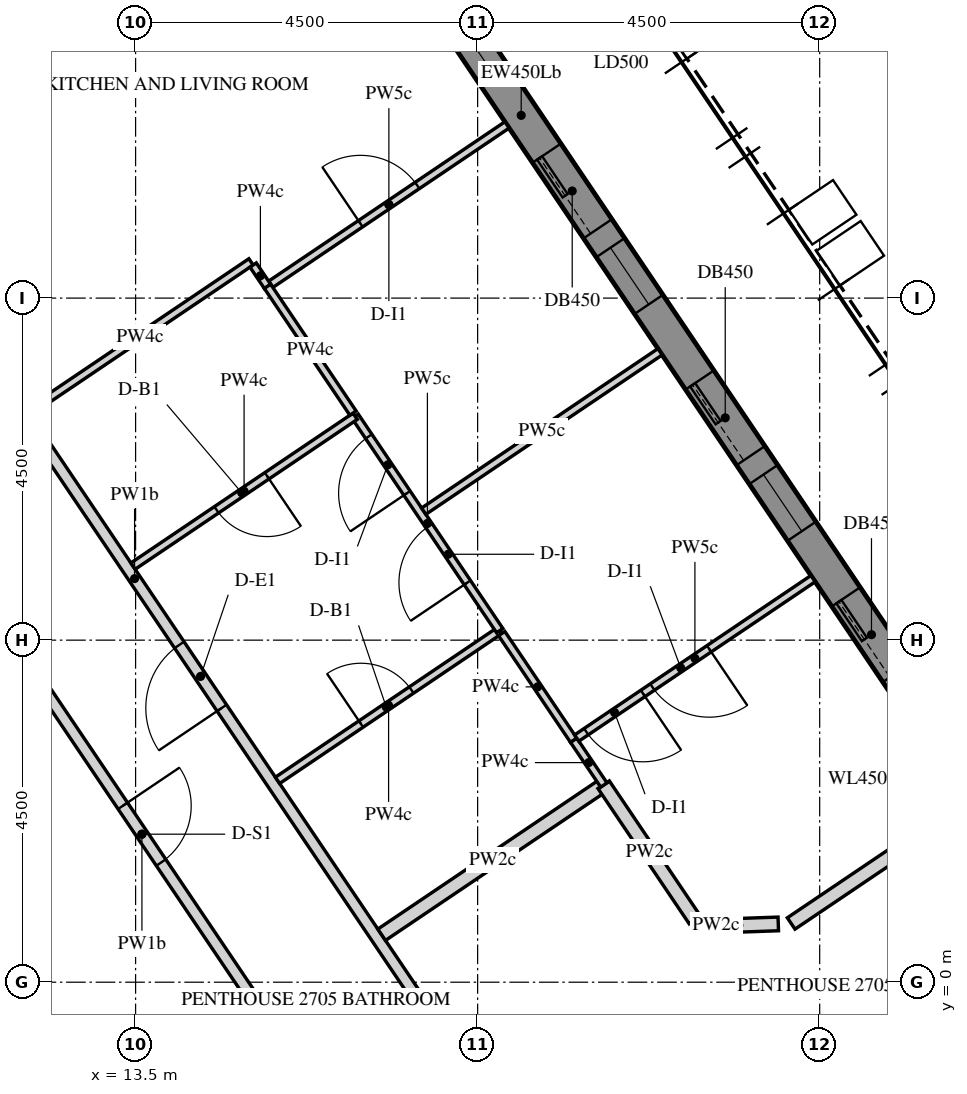
"""IFC4 building model, lengths in metres.
Left out: names, types, materials, properties, quantities, classifications, styles, units other than length and angle.
Written with IfcOpenShell. Run it as: python <this file> out.ifc"""

import sys

from ifc_helpers import new_model, si_unit, direction, frame, frame_2d, origin, place, context, subcontext, project, spatial, polyline, rectangle, outline, extrude, element, fill, save


model = new_model("IFC4")
c1 = context("Model", 3, precision=1e-05, world=origin(), true_north=direction((0.0, 1.0)))
c2 = subcontext(c1, "Body", "Model", "MODEL_VIEW")
j1 = project(units=[si_unit("LENGTHUNIT", "METRE"), si_unit("PLANEANGLEUNIT", "RADIAN")], contexts=[c1])
p1 = place(None, origin())
s1 = spatial("IfcSite", under=j1, at=p1, CompositionType="ELEMENT")
p2 = place(p1, origin())
s2 = spatial("IfcBuilding", under=s1, at=p2, CompositionType="ELEMENT")
p3 = place(p2, frame((0.0, 0.0, 349.5)))
s3 = spatial("IfcBuildingStorey", under=s2, at=p3, CompositionType="ELEMENT", Elevation=349.5)
p4 = place(p3, frame((24.37, 2.811, 0.0), z_axis=(0.0, 0.0, 1.0), x_axis=(-0.559187034749, 0.829041531027, 0.0)))
e1 = element("IfcWall", 1, at=p4, inside=s3, PredefinedType="SOLIDWALL", context=c2, shape_type="SweptSolid", body=[
    extrude(outline(polyline([(0.225, -0.225), (20.506, -0.225), (20.957, 0.225), (-0.225, 0.225), (0.225, -0.225)])), origin(), (0.0, 0.0, 1.0), 3.75),
])
p5 = place(p4, frame((0.325, 0.0, 0.9)))
e2 = element("IfcOpeningElement", 2, at=p5, cuts=e1, PredefinedType="OPENING", context=c2, shape_type="SweptSolid", body=[
    extrude(rectangle(XDim=0.9, YDim=1.5, at=frame_2d((0.45, 0.75))), frame((0.0, 0.235, 0.0), z_axis=(0.0, -1.0, 0.0), x_axis=(1.0, 0.0, 0.0)), (0.0, 0.0, 1.0), 0.47),
])
p6 = place(p4, frame((1.525, 0.0, 0.0)))
e3 = element("IfcOpeningElement", 3, at=p6, cuts=e1, PredefinedType="OPENING", context=c2, shape_type="SweptSolid", body=[
    extrude(rectangle(XDim=1.2, YDim=2.4, at=frame_2d((0.6, 1.2))), frame((0.0, 0.235, 0.0), z_axis=(0.0, -1.0, 0.0), x_axis=(1.0, 0.0, 0.0)), (0.0, 0.0, 1.0), 0.47),
])
p7 = place(p4, frame((3.766, 0.0, 0.9)))
e4 = element("IfcOpeningElement", 4, at=p7, cuts=e1, PredefinedType="OPENING", context=c2, shape_type="SweptSolid", body=[
    extrude(rectangle(XDim=0.9, YDim=1.5, at=frame_2d((0.45, 0.75))), frame((0.0, 0.235, 0.0), z_axis=(0.0, -1.0, 0.0), x_axis=(1.0, 0.0, 0.0)), (0.0, 0.0, 1.0), 0.47),
])
p8 = place(p4, frame((4.966, 0.0, 0.0)))
e5 = element("IfcOpeningElement", 5, at=p8, cuts=e1, PredefinedType="OPENING", context=c2, shape_type="SweptSolid", body=[
    extrude(rectangle(XDim=1.2, YDim=2.4, at=frame_2d((0.6, 1.2))), frame((0.0, 0.235, 0.0), z_axis=(0.0, -1.0, 0.0), x_axis=(1.0, 0.0, 0.0)), (0.0, 0.0, 1.0), 0.47),
])
p9 = place(p4, frame((7.366, 0.0, 0.9)))
e6 = element("IfcOpeningElement", 6, at=p9, cuts=e1, PredefinedType="OPENING", context=c2, shape_type="SweptSolid", body=[
    extrude(rectangle(XDim=0.9, YDim=1.5, at=frame_2d((0.45, 0.75))), frame((0.0, 0.235, 0.0), z_axis=(0.0, -1.0, 0.0), x_axis=(1.0, 0.0, 0.0)), (0.0, 0.0, 1.0), 0.47),
])
p10 = place(p4, frame((8.566, 0.0, 0.0)))
e7 = element("IfcOpeningElement", 7, at=p10, cuts=e1, PredefinedType="OPENING", context=c2, shape_type="SweptSolid", body=[
    extrude(rectangle(XDim=1.2, YDim=2.4, at=frame_2d((0.6, 1.2))), frame((0.0, 0.235, 0.0), z_axis=(0.0, -1.0, 0.0), x_axis=(1.0, 0.0, 0.0)), (0.0, 0.0, 1.0), 0.47),
])
p11 = place(p4, frame((10.966, 0.0, 0.9)))
e8 = element("IfcOpeningElement", 8, at=p11, cuts=e1, PredefinedType="OPENING", context=c2, shape_type="SweptSolid", body=[
    extrude(rectangle(XDim=0.9, YDim=1.5, at=frame_2d((0.45, 0.75))), frame((0.0, 0.235, 0.0), z_axis=(0.0, -1.0, 0.0), x_axis=(1.0, 0.0, 0.0)), (0.0, 0.0, 1.0), 0.47),
])
p12 = place(p4, frame((12.166, 0.0, 0.0)))
e9 = element("IfcOpeningElement", 9, at=p12, cuts=e1, PredefinedType="OPENING", context=c2, shape_type="SweptSolid", body=[
    extrude(rectangle(XDim=1.2, YDim=2.4, at=frame_2d((0.6, 1.2))), frame((0.0, 0.235, 0.0), z_axis=(0.0, -1.0, 0.0), x_axis=(1.0, 0.0, 0.0)), (0.0, 0.0, 1.0), 0.47),
])
p13 = place(p4, frame((14.566, 0.0, 0.9)))
e10 = element("IfcOpeningElement", 10, at=p13, cuts=e1, PredefinedType="OPENING", context=c2, shape_type="SweptSolid", body=[
    extrude(rectangle(XDim=0.9, YDim=1.5, at=frame_2d((0.45, 0.75))), frame((0.0, 0.235, 0.0), z_axis=(0.0, -1.0, 0.0), x_axis=(1.0, 0.0, 0.0)), (0.0, 0.0, 1.0), 0.47),
])
p14 = place(p4, frame((15.766, 0.0, 0.0)))
e11 = element("IfcOpeningElement", 11, at=p14, cuts=e1, PredefinedType="OPENING", context=c2, shape_type="SweptSolid", body=[
    extrude(rectangle(XDim=1.2, YDim=2.4, at=frame_2d((0.6, 1.2))), frame((0.0, 0.235, 0.0), z_axis=(0.0, -1.0, 0.0), x_axis=(1.0, 0.0, 0.0)), (0.0, 0.0, 1.0), 0.47),
])
p15 = place(p4, frame((18.007, 0.0, 0.9)))
e12 = element("IfcOpeningElement", 12, at=p15, cuts=e1, PredefinedType="OPENING", context=c2, shape_type="SweptSolid", body=[
    extrude(rectangle(XDim=0.9, YDim=1.5, at=frame_2d((0.45, 0.75))), frame((0.0, 0.235, 0.0), z_axis=(0.0, -1.0, 0.0), x_axis=(1.0, 0.0, 0.0)), (0.0, 0.0, 1.0), 0.47),
])
p16 = place(p4, frame((19.207, 0.0, 0.0)))
e13 = element("IfcOpeningElement", 13, at=p16, cuts=e1, PredefinedType="OPENING", context=c2, shape_type="SweptSolid", body=[
    extrude(rectangle(XDim=1.2, YDim=2.4, at=frame_2d((0.6, 1.2))), frame((0.0, 0.235, 0.0), z_axis=(0.0, -1.0, 0.0), x_axis=(1.0, 0.0, 0.0)), (0.0, 0.0, 1.0), 0.47),
])
p17 = place(p3, frame((5.773, 10.0, 0.0), z_axis=(0.0, 0.0, 1.0), x_axis=(0.500007911273, 0.866020836161, 0.0)))
e14 = element("IfcWall", 14, at=p17, inside=s3, PredefinedType="SHEAR", context=c2, shape_type="SweptSolid", body=[
    extrude(rectangle(XDim=14.51, YDim=0.35, at=frame_2d((7.255, 0.0))), origin(), (0.0, 0.0, 1.0), 3.75),
])
p18 = place(p17, frame((6.355, 0.0, 0.0)))
e15 = element("IfcOpeningElement", 15, at=p18, cuts=e14, PredefinedType="OPENING", context=c2, shape_type="SweptSolid", body=[
    extrude(rectangle(XDim=1.8, YDim=2.4, at=frame_2d((0.9, 1.2))), frame((0.0, 0.185, 0.0), z_axis=(0.0, -1.0, 0.0), x_axis=(1.0, 0.0, 0.0)), (0.0, 0.0, 1.0), 0.37),
])
p19 = place(p3, frame((17.873, -1.193, 0.0), z_axis=(0.0, 0.0, 1.0), x_axis=(-0.559195650252, 0.829035719821, 0.0)))
e16 = element("IfcWall", 16, at=p19, inside=s3, PredefinedType="PARTITIONING", context=c2, shape_type="SweptSolid", body=[
    extrude(rectangle(XDim=15.688, YDim=0.15, at=frame_2d((7.844, 0.0))), origin(), (0.0, 0.0, 1.0), 2.82),
])
p20 = place(p19, frame((5.792, 0.0, 0.0)))
e17 = element("IfcOpeningElement", 17, at=p20, cuts=e16, PredefinedType="OPENING", context=c2, shape_type="SweptSolid", body=[
    extrude(rectangle(XDim=1.0, YDim=2.1, at=frame_2d((0.5, 1.05))), frame((0.0, 0.085, 0.0), z_axis=(0.0, -1.0, 0.0), x_axis=(1.0, 0.0, 0.0)), (0.0, 0.0, 1.0), 0.17),
])
p21 = place(p3, frame((11.368, 5.231, 0.0), z_axis=(0.0, 0.0, 1.0), x_axis=(0.55919388604, -0.829036909803, 0.0)))
e18 = element("IfcWall", 18, at=p21, inside=s3, PredefinedType="PARTITIONING", context=c2, shape_type="SweptSolid", body=[
    extrude(rectangle(XDim=7.922, YDim=0.15, at=frame_2d((3.961, 0.0))), origin(), (0.0, 0.0, 1.0), 2.82),
])
p22 = place(p21, frame((3.511, 0.0, 0.0)))
e19 = element("IfcOpeningElement", 19, at=p22, cuts=e18, PredefinedType="OPENING", context=c2, shape_type="SweptSolid", body=[
    extrude(rectangle(XDim=0.9, YDim=2.1, at=frame_2d((0.45, 1.05))), frame((0.0, 0.085, 0.0), z_axis=(0.0, -1.0, 0.0), x_axis=(1.0, 0.0, 0.0)), (0.0, 0.0, 1.0), 0.17),
])
p23 = place(p3, frame((19.66, 2.595, 0.0), z_axis=(0.0, 0.0, 1.0), x_axis=(-0.829033300448, -0.559199237078, 0.0)))
e20 = element("IfcWall", 20, at=p23, inside=s3, PredefinedType="PARTITIONING", context=c2, shape_type="SweptSolid", body=[
    extrude(rectangle(XDim=3.525, YDim=0.18, at=frame_2d((1.763, 0.0))), origin(), (0.0, 0.0, 1.0), 2.82),
])
p24 = place(p3, frame((26.084, 3.443, 0.0), z_axis=(0.0, 0.0, 1.0), x_axis=(-0.829033545972, -0.559198873079, 0.0)))
e21 = element("IfcWall", 21, at=p24, inside=s3, PredefinedType="PARTITIONING", context=c2, shape_type="SweptSolid", body=[
    extrude(rectangle(XDim=4.775, YDim=0.18, at=frame_2d((2.388, 0.0))), origin(), (0.0, 0.0, 1.0), 2.82),
])
p25 = place(p3, frame((21.955, 0.767, 0.0), z_axis=(0.0, 0.0, 1.0), x_axis=(-0.999394211814, -0.034802433729, 0.0)))
e22 = element("IfcWall", 22, at=p25, inside=s3, PredefinedType="PARTITIONING", context=c2, shape_type="SweptSolid", body=[
    extrude(rectangle(XDim=1.038, YDim=0.18, at=frame_2d((0.519, 0.0))), origin(), (0.0, 0.0, 1.0), 2.82),
])
p26 = place(p3, frame((20.858, 0.818, 0.0), z_axis=(0.0, 0.0, 1.0), x_axis=(-0.55920528272, 0.829029222512, 0.0)))
e23 = element("IfcWall", 23, at=p26, inside=s3, PredefinedType="PARTITIONING", context=c2, shape_type="SweptSolid", body=[
    extrude(rectangle(XDim=2.147, YDim=0.18, at=frame_2d((1.074, 0.0))), origin(), (0.0, 0.0, 1.0), 2.82),
])
p27 = place(p3, frame((15.278, 9.181, 0.0), z_axis=(0.0, 0.0, 1.0), x_axis=(0.829043350963, 0.559184336534, 0.0)))
e24 = element("IfcWall", 24, at=p27, inside=s3, PredefinedType="PARTITIONING", context=c2, shape_type="SweptSolid", body=[
    extrude(rectangle(XDim=3.75, YDim=0.1, at=frame_2d((1.875, 0.0))), origin(), (0.0, 0.0, 1.0), 2.82),
])
p28 = place(p27, frame((1.425, 0.0, 0.0)))
e25 = element("IfcOpeningElement", 25, at=p28, cuts=e24, PredefinedType="OPENING", context=c2, shape_type="SweptSolid", body=[
    extrude(rectangle(XDim=0.9, YDim=2.1, at=frame_2d((0.45, 1.05))), frame((0.0, 0.06, 0.0), z_axis=(0.0, -1.0, 0.0), x_axis=(1.0, 0.0, 0.0)), (0.0, 0.0, 1.0), 0.12),
])
p29 = place(p3, frame((12.096, 7.505, 0.0), z_axis=(0.0, 0.0, 1.0), x_axis=(0.829065408555, 0.559151632687, 0.0)))
e26 = element("IfcWall", 26, at=p29, inside=s3, PredefinedType="PARTITIONING", context=c2, shape_type="SweptSolid", body=[
    extrude(rectangle(XDim=3.525, YDim=0.1, at=frame_2d((1.762, 0.0))), origin(), (0.0, 0.0, 1.0), 2.82),
])
p30 = place(p3, frame((15.046, 9.435, 0.0), z_axis=(0.0, 0.0, 1.0), x_axis=(0.559141668278, -0.829072128826, 0.0)))
e27 = element("IfcWall", 27, at=p30, inside=s3, PredefinedType="PARTITIONING", context=c2, shape_type="SweptSolid", body=[
    extrude(rectangle(XDim=0.342, YDim=0.1, at=frame_2d((0.171, 0.0))), origin(), (0.0, 0.0, 1.0), 2.82),
])
p31 = place(p3, frame((15.367, 2.655, 0.0), z_axis=(0.0, 0.0, 1.0), x_axis=(0.829033300448, 0.559199237078, 0.0)))
e28 = element("IfcWall", 28, at=p31, inside=s3, PredefinedType="PARTITIONING", context=c2, shape_type="SweptSolid", body=[
    extrude(rectangle(XDim=3.525, YDim=0.1, at=frame_2d((1.763, 0.0))), origin(), (0.0, 0.0, 1.0), 2.82),
])
p32 = place(p31, frame((1.325, 0.0, 0.0)))
e29 = element("IfcOpeningElement", 29, at=p32, cuts=e28, PredefinedType="OPENING", context=c2, shape_type="SweptSolid", body=[
    extrude(rectangle(XDim=0.8, YDim=2.1, at=frame_2d((0.4, 1.05))), frame((0.0, 0.06, 0.0), z_axis=(0.0, -1.0, 0.0), x_axis=(1.0, 0.0, 0.0)), (0.0, 0.0, 1.0), 0.12),
])
p33 = place(p3, frame((18.291, 4.625, 0.0), z_axis=(0.0, 0.0, 1.0), x_axis=(-0.55916115895, 0.82905898362, 0.0)))
e30 = element("IfcWall", 30, at=p33, inside=s3, PredefinedType="PARTITIONING", context=c2, shape_type="SweptSolid", body=[
    extrude(rectangle(XDim=3.404, YDim=0.1, at=frame_2d((1.702, 0.0))), origin(), (0.0, 0.0, 1.0), 2.82),
])
p34 = place(p33, frame((0.762, 0.0, 0.0)))
e31 = element("IfcOpeningElement", 31, at=p34, cuts=e30, PredefinedType="OPENING", context=c2, shape_type="SweptSolid", body=[
    extrude(rectangle(XDim=0.9, YDim=2.1, at=frame_2d((0.45, 1.05))), frame((0.0, 0.06, 0.0), z_axis=(0.0, -1.0, 0.0), x_axis=(1.0, 0.0, 0.0)), (0.0, 0.0, 1.0), 0.12),
])
p35 = place(p33, frame((2.182, 0.0, 0.0)))
e32 = element("IfcOpeningElement", 32, at=p35, cuts=e30, PredefinedType="OPENING", context=c2, shape_type="SweptSolid", body=[
    extrude(rectangle(XDim=0.9, YDim=2.1, at=frame_2d((0.45, 1.05))), frame((0.0, 0.06, 0.0), z_axis=(0.0, -1.0, 0.0), x_axis=(1.0, 0.0, 0.0)), (0.0, 0.0, 1.0), 0.12),
])
p36 = place(p3, frame((16.388, 7.445, 0.0), z_axis=(0.0, 0.0, 1.0), x_axis=(-0.829033300448, -0.559199237078, 0.0)))
e33 = element("IfcWall", 33, at=p36, inside=s3, PredefinedType="PARTITIONING", context=c2, shape_type="SweptSolid", body=[
    extrude(rectangle(XDim=3.525, YDim=0.1, at=frame_2d((1.763, 0.0))), origin(), (0.0, 0.0, 1.0), 2.82),
])
p37 = place(p36, frame((1.4, 0.0, 0.0)))
e34 = element("IfcOpeningElement", 34, at=p37, cuts=e33, PredefinedType="OPENING", context=c2, shape_type="SweptSolid", body=[
    extrude(rectangle(XDim=0.8, YDim=2.1, at=frame_2d((0.4, 1.05))), frame((0.0, 0.06, 0.0), z_axis=(0.0, -1.0, 0.0), x_axis=(1.0, 0.0, 0.0)), (0.0, 0.0, 1.0), 0.12),
])
p38 = place(p3, frame((19.661, 2.594, 0.0), z_axis=(0.0, 0.0, 1.0), x_axis=(-0.559278611344, 0.828979755418, 0.0)))
e35 = element("IfcWall", 35, at=p38, inside=s3, PredefinedType="PARTITIONING", context=c2, shape_type="SweptSolid", body=[
    extrude(rectangle(XDim=0.712, YDim=0.1, at=frame_2d((0.356, 0.0))), origin(), (0.0, 0.0, 1.0), 2.82),
])
p39 = place(p3, frame((19.262, 3.184, 0.0), z_axis=(0.0, 0.0, 1.0), x_axis=(-0.559155511525, 0.829062792514, 0.0)))
e36 = element("IfcWall", 36, at=p39, inside=s3, PredefinedType="PARTITIONING", context=c2, shape_type="SweptSolid", body=[
    extrude(rectangle(XDim=1.691, YDim=0.1, at=frame_2d((0.846, 0.0))), origin(), (0.0, 0.0, 1.0), 2.82),
])
p40 = place(p3, frame((22.413, 5.309, 0.0), z_axis=(0.0, 0.0, 1.0), x_axis=(-0.829013169089, -0.559229081394, 0.0)))
e37 = element("IfcWall", 37, at=p40, inside=s3, PredefinedType="PARTITIONING", context=c2, shape_type="SweptSolid", body=[
    extrude(rectangle(XDim=3.75, YDim=0.1, at=frame_2d((1.875, 0.0))), origin(), (0.0, 0.0, 1.0), 2.82),
])
p41 = place(p40, frame((2.7, 0.0, 0.0)))
e38 = element("IfcOpeningElement", 38, at=p41, cuts=e37, PredefinedType="OPENING", context=c2, shape_type="SweptSolid", body=[
    extrude(rectangle(XDim=0.9, YDim=2.1, at=frame_2d((0.45, 1.05))), frame((0.0, 0.06, 0.0), z_axis=(0.0, -1.0, 0.0), x_axis=(1.0, 0.0, 0.0)), (0.0, 0.0, 1.0), 0.12),
])
p42 = place(p40, frame((1.65, 0.0, 0.0)))
e39 = element("IfcOpeningElement", 39, at=p42, cuts=e37, PredefinedType="OPENING", context=c2, shape_type="SweptSolid", body=[
    extrude(rectangle(XDim=0.9, YDim=2.1, at=frame_2d((0.45, 1.05))), frame((0.0, 0.06, 0.0), z_axis=(0.0, -1.0, 0.0), x_axis=(1.0, 0.0, 0.0)), (0.0, 0.0, 1.0), 0.12),
])
p43 = place(p3, frame((20.4, 8.294, 0.0), z_axis=(0.0, 0.0, 1.0), x_axis=(-0.829043350963, -0.559184336534, 0.0)))
e40 = element("IfcWall", 40, at=p43, inside=s3, PredefinedType="PARTITIONING", context=c2, shape_type="SweptSolid", body=[
    extrude(rectangle(XDim=3.75, YDim=0.1, at=frame_2d((1.875, 0.0))), origin(), (0.0, 0.0, 1.0), 2.82),
])
p44 = place(p3, frame((15.235, 9.155, 0.0), z_axis=(0.0, 0.0, 1.0), x_axis=(0.559199850123, -0.829032886937, 0.0)))
e41 = element("IfcWall", 41, at=p44, inside=s3, PredefinedType="PARTITIONING", context=c2, shape_type="SweptSolid", body=[
    extrude(rectangle(XDim=2.012, YDim=0.1, at=frame_2d((1.006, 0.0))), origin(), (0.0, 0.0, 1.0), 2.82),
])
p45 = place(p6, frame((0.0, 0.15, 0.0)))
e42 = element("IfcDoor", 42, at=p45, inside=s3, OperationType="SLIDING_TO_LEFT", PredefinedType="DOOR", context=c2, shape_type="SweptSolid", body=[
    extrude(rectangle(XDim=1.2, YDim=2.4, at=frame_2d((0.6, 1.2))), frame((0.0, 0.025, 0.0), z_axis=(0.0, -1.0, 0.0), x_axis=(1.0, 0.0, 0.0)), (0.0, 0.0, 1.0), 0.05),
])
fill(e3, e42)
p46 = place(p7, frame((0.0, 0.155, 0.0)))
e43 = element("IfcWindow", 43, at=p46, inside=s3, PartitioningType="SINGLE_PANEL", PredefinedType="WINDOW", context=c2, shape_type="SweptSolid", body=[
    extrude(rectangle(XDim=0.9, YDim=1.5, at=frame_2d((0.45, 0.75))), frame((0.0, 0.03, 0.0), z_axis=(0.0, -1.0, 0.0), x_axis=(1.0, 0.0, 0.0)), (0.0, 0.0, 1.0), 0.06),
])
fill(e4, e43)
p47 = place(p8, frame((0.0, 0.15, 0.0)))
e44 = element("IfcDoor", 44, at=p47, inside=s3, OperationType="SLIDING_TO_LEFT", PredefinedType="DOOR", context=c2, shape_type="SweptSolid", body=[
    extrude(rectangle(XDim=1.2, YDim=2.4, at=frame_2d((0.6, 1.2))), frame((0.0, 0.025, 0.0), z_axis=(0.0, -1.0, 0.0), x_axis=(1.0, 0.0, 0.0)), (0.0, 0.0, 1.0), 0.05),
])
fill(e5, e44)
p48 = place(p9, frame((0.0, 0.155, 0.0)))
e45 = element("IfcWindow", 45, at=p48, inside=s3, PartitioningType="SINGLE_PANEL", PredefinedType="WINDOW", context=c2, shape_type="SweptSolid", body=[
    extrude(rectangle(XDim=0.9, YDim=1.5, at=frame_2d((0.45, 0.75))), frame((0.0, 0.03, 0.0), z_axis=(0.0, -1.0, 0.0), x_axis=(1.0, 0.0, 0.0)), (0.0, 0.0, 1.0), 0.06),
])
fill(e6, e45)
p49 = place(p10, frame((0.0, 0.15, 0.0)))
e46 = element("IfcDoor", 46, at=p49, inside=s3, OperationType="SLIDING_TO_LEFT", PredefinedType="DOOR", context=c2, shape_type="SweptSolid", body=[
    extrude(rectangle(XDim=1.2, YDim=2.4, at=frame_2d((0.6, 1.2))), frame((0.0, 0.025, 0.0), z_axis=(0.0, -1.0, 0.0), x_axis=(1.0, 0.0, 0.0)), (0.0, 0.0, 1.0), 0.05),
])
fill(e7, e46)
p50 = place(p11, frame((0.0, 0.155, 0.0)))
e47 = element("IfcWindow", 47, at=p50, inside=s3, PartitioningType="SINGLE_PANEL", PredefinedType="WINDOW", context=c2, shape_type="SweptSolid", body=[
    extrude(rectangle(XDim=0.9, YDim=1.5, at=frame_2d((0.45, 0.75))), frame((0.0, 0.03, 0.0), z_axis=(0.0, -1.0, 0.0), x_axis=(1.0, 0.0, 0.0)), (0.0, 0.0, 1.0), 0.06),
])
fill(e8, e47)
p51 = place(p20, origin())
e48 = element("IfcDoor", 48, at=p51, inside=s3, OperationType="SINGLE_SWING_LEFT", PredefinedType="DOOR", context=c2, shape_type="SweptSolid", body=[
    extrude(rectangle(XDim=1.0, YDim=2.1, at=frame_2d((0.5, 1.05))), frame((0.0, 0.025, 0.0), z_axis=(0.0, -1.0, 0.0), x_axis=(1.0, 0.0, 0.0)), (0.0, 0.0, 1.0), 0.05),
])
fill(e17, e48)
p52 = place(p32, origin())
e49 = element("IfcDoor", 49, at=p52, inside=s3, OperationType="SINGLE_SWING_RIGHT", PredefinedType="DOOR", context=c2, shape_type="SweptSolid", body=[
    extrude(rectangle(XDim=0.8, YDim=2.1, at=frame_2d((0.4, 1.05))), frame((0.0, 0.025, 0.0), z_axis=(0.0, -1.0, 0.0), x_axis=(1.0, 0.0, 0.0)), (0.0, 0.0, 1.0), 0.05),
])
fill(e29, e49)
p53 = place(p34, origin())
e50 = element("IfcDoor", 50, at=p53, inside=s3, OperationType="SINGLE_SWING_LEFT", PredefinedType="DOOR", context=c2, shape_type="SweptSolid", body=[
    extrude(rectangle(XDim=0.9, YDim=2.1, at=frame_2d((0.45, 1.05))), frame((0.0, 0.025, 0.0), z_axis=(0.0, -1.0, 0.0), x_axis=(1.0, 0.0, 0.0)), (0.0, 0.0, 1.0), 0.05),
])
fill(e31, e50)
p54 = place(p41, origin())
e51 = element("IfcDoor", 51, at=p54, inside=s3, OperationType="SINGLE_SWING_RIGHT", PredefinedType="DOOR", context=c2, shape_type="SweptSolid", body=[
    extrude(rectangle(XDim=0.9, YDim=2.1, at=frame_2d((0.45, 1.05))), frame((0.0, 0.025, 0.0), z_axis=(0.0, -1.0, 0.0), x_axis=(1.0, 0.0, 0.0)), (0.0, 0.0, 1.0), 0.05),
])
fill(e38, e51)
p55 = place(p42, origin())
e52 = element("IfcDoor", 52, at=p55, inside=s3, OperationType="SINGLE_SWING_LEFT", PredefinedType="DOOR", context=c2, shape_type="SweptSolid", body=[
    extrude(rectangle(XDim=0.9, YDim=2.1, at=frame_2d((0.45, 1.05))), frame((0.0, 0.025, 0.0), z_axis=(0.0, -1.0, 0.0), x_axis=(1.0, 0.0, 0.0)), (0.0, 0.0, 1.0), 0.05),
])
fill(e39, e52)
p56 = place(p35, origin())
e53 = element("IfcDoor", 53, at=p56, inside=s3, OperationType="SINGLE_SWING_LEFT", PredefinedType="DOOR", context=c2, shape_type="SweptSolid", body=[
    extrude(rectangle(XDim=0.9, YDim=2.1, at=frame_2d((0.45, 1.05))), frame((0.0, 0.025, 0.0), z_axis=(0.0, -1.0, 0.0), x_axis=(1.0, 0.0, 0.0)), (0.0, 0.0, 1.0), 0.05),
])
fill(e32, e53)
p57 = place(p37, origin())
e54 = element("IfcDoor", 54, at=p57, inside=s3, OperationType="SINGLE_SWING_LEFT", PredefinedType="DOOR", context=c2, shape_type="SweptSolid", body=[
    extrude(rectangle(XDim=0.8, YDim=2.1, at=frame_2d((0.4, 1.05))), frame((0.0, 0.025, 0.0), z_axis=(0.0, -1.0, 0.0), x_axis=(1.0, 0.0, 0.0)), (0.0, 0.0, 1.0), 0.05),
])
fill(e34, e54)
p58 = place(p28, origin())
e55 = element("IfcDoor", 55, at=p58, inside=s3, OperationType="SINGLE_SWING_RIGHT", PredefinedType="DOOR", context=c2, shape_type="SweptSolid", body=[
    extrude(rectangle(XDim=0.9, YDim=2.1, at=frame_2d((0.45, 1.05))), frame((0.0, 0.025, 0.0), z_axis=(0.0, -1.0, 0.0), x_axis=(1.0, 0.0, 0.0)), (0.0, 0.0, 1.0), 0.05),
])
fill(e25, e55)
p59 = place(p22, origin())
e56 = element("IfcDoor", 56, at=p59, inside=s3, OperationType="SINGLE_SWING_RIGHT", PredefinedType="DOOR", context=c2, shape_type="SweptSolid", body=[
    extrude(rectangle(XDim=0.9, YDim=2.1, at=frame_2d((0.45, 1.05))), frame((0.0, 0.025, 0.0), z_axis=(0.0, -1.0, 0.0), x_axis=(1.0, 0.0, 0.0)), (0.0, 0.0, 1.0), 0.05),
])
fill(e19, e56)
save(model, sys.argv[1])
